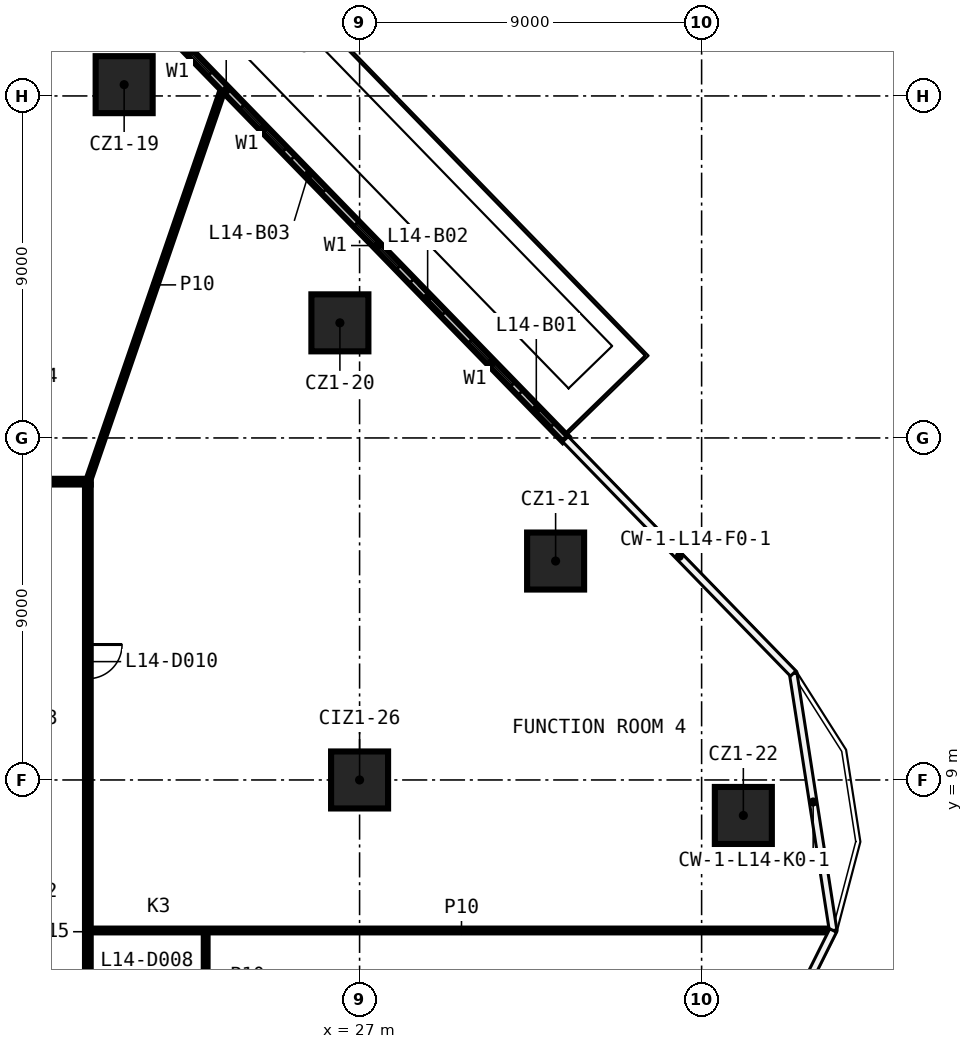
"""IFC4 building model, lengths in metres.
Left out: names, types, materials, properties, quantities, classifications, styles, units other than length and angle.
Written with IfcOpenShell. Run it as: python <this file> out.ifc"""

import sys

from ifc_helpers import new_model, si_unit, direction, frame, frame_2d, origin, origin_2d, place, context, subcontext, project, spatial, rectangle, extrude, element, fill, save


model = new_model("IFC4")
c1 = context("Model", 3, precision=1e-05, world=origin(), true_north=direction((0.0, 1.0)))
c2 = subcontext(c1, "Body", "Model", "MODEL_VIEW")
j1 = project(units=[si_unit("LENGTHUNIT", "METRE"), si_unit("PLANEANGLEUNIT", "RADIAN")], contexts=[c1])
p1 = place(None, origin())
s1 = spatial("IfcSite", under=j1, at=p1, CompositionType="ELEMENT")
p2 = place(p1, origin())
s2 = spatial("IfcBuilding", under=s1, at=p2, CompositionType="ELEMENT")
p3 = place(p2, frame((0.0, 0.0, 73.6)))
s3 = spatial("IfcBuildingStorey", under=s2, at=p3, CompositionType="ELEMENT", Elevation=73.6)
for number, where, z_axis, x_axis in (
    (1, (20.805, 27.297, 0.0), (0.0, 0.0, 1.0), (1.0, 0.0, 0.0)),
    (2, (26.482, 21.029, 0.0), (0.0, 0.0, 1.0), (1.0, 0.0, 0.0)),
    (3, (32.158, 14.761, 0.0), (0.0, 0.0, 1.0), (1.0, 0.0, 0.0)),
    (4, (37.098, 8.066, 0.0), (0.0, 0.0, 1.0), (1.0, 0.0, 0.0)),
    (5, (27.0, 9.0, 0.0), (0.0, 0.0, 1.0), (1.0, 0.0, 0.0)),
):
    element("IfcColumn", number, at=place(p3, frame(where, z_axis=z_axis, x_axis=x_axis)), inside=s3, PredefinedType="COLUMN", context=c2, shape_type="SweptSolid", body=[
        extrude(rectangle(XDim=1.5, YDim=1.5, at=origin_2d()), origin(), (0.0, 0.0, 1.0), 3.3),
    ])
p4 = place(p3, frame((19.925, 5.039, 0.0), z_axis=(0.0, 0.0, 1.0), x_axis=(1.0, 0.0, 0.0)))
e6 = element("IfcWall", 6, at=p4, inside=s3, PredefinedType="PARTITIONING", context=c2, shape_type="SweptSolid", body=[
    extrude(rectangle(XDim=19.513, YDim=0.1, at=frame_2d((9.757, 0.0))), origin(), (0.0, 0.0, 1.0), 3.3),
])
p5 = place(p3, frame((-19.925, 16.85, 0.0), z_axis=(0.0, 0.0, 1.0), x_axis=(1.0, 0.0, 0.0)))
e7 = element("IfcWall", 7, at=p5, inside=s3, PredefinedType="PARTITIONING", context=c2, shape_type="SweptSolid", body=[
    extrude(rectangle(XDim=39.85, YDim=0.15, at=frame_2d((19.925, 0.0))), origin(), (0.0, 0.0, 1.0), 3.3),
])
p6 = place(p5, frame((31.436, 0.0, 0.0)))
e8 = element("IfcOpeningElement", 8, at=p6, cuts=e7, PredefinedType="OPENING", context=c2, shape_type="SweptSolid", body=[
    extrude(rectangle(XDim=0.9, YDim=2.1, at=frame_2d((0.45, 1.05))), frame((0.0, 0.085, 0.0), z_axis=(0.0, -1.0, 0.0), x_axis=(1.0, 0.0, 0.0)), (0.0, 0.0, 1.0), 0.17),
])
p7 = place(p5, frame((16.954, 0.0, 0.0)))
e9 = element("IfcOpeningElement", 9, at=p7, cuts=e7, PredefinedType="OPENING", context=c2, shape_type="SweptSolid", body=[
    extrude(rectangle(XDim=0.9, YDim=2.1, at=frame_2d((0.45, 1.05))), frame((0.0, 0.085, 0.0), z_axis=(0.0, -1.0, 0.0), x_axis=(1.0, 0.0, 0.0)), (0.0, 0.0, 1.0), 0.17),
])
p8 = place(p5, frame((7.208, 0.0, 0.0)))
e10 = element("IfcOpeningElement", 10, at=p8, cuts=e7, PredefinedType="OPENING", context=c2, shape_type="SweptSolid", body=[
    extrude(rectangle(XDim=0.9, YDim=2.1, at=frame_2d((0.45, 1.05))), frame((0.0, 0.085, 0.0), z_axis=(0.0, -1.0, 0.0), x_axis=(1.0, 0.0, 0.0)), (0.0, 0.0, 1.0), 0.17),
])
p9 = place(p3, frame((19.85, 16.85, 0.0), z_axis=(0.0, 0.0, 1.0), x_axis=(0.32525482398, 0.94562640587, 0.0)))
e11 = element("IfcWall", 11, at=p9, inside=s3, PredefinedType="PARTITIONING", context=c2, shape_type="SweptSolid", body=[
    extrude(rectangle(XDim=10.952, YDim=0.1, at=frame_2d((5.476, 0.0))), origin(), (0.0, 0.0, 1.0), 3.3),
])
p10 = place(p3, frame((22.95, 2.689, 0.0), z_axis=(0.0, 0.0, 1.0), x_axis=(0.0, 1.0, 0.0)))
e12 = element("IfcWall", 12, at=p10, inside=s3, PredefinedType="PARTITIONING", context=c2, shape_type="SweptSolid", body=[
    extrude(rectangle(XDim=2.3, YDim=0.1, at=frame_2d((1.15, 0.0))), origin(), (0.0, 0.0, 1.0), 3.3),
])
p11 = place(p3, frame((19.85, 16.775, 0.0), z_axis=(0.0, 0.0, 1.0), x_axis=(0.0, -1.0, 0.0)))
e13 = element("IfcWall", 13, at=p11, inside=s3, PredefinedType="PARTITIONING", context=c2, shape_type="SweptSolid", body=[
    extrude(rectangle(XDim=33.55, YDim=0.15, at=frame_2d((16.775, 0.0))), origin(), (0.0, 0.0, 1.0), 3.3),
])
p12 = place(p11, frame((21.293, 0.0, 0.0)))
e14 = element("IfcOpeningElement", 14, at=p12, cuts=e13, PredefinedType="OPENING", context=c2, shape_type="SweptSolid", body=[
    extrude(rectangle(XDim=1.0, YDim=2.1, at=frame_2d((0.5, 1.05))), frame((0.0, 0.085, 0.0), z_axis=(0.0, -1.0, 0.0), x_axis=(1.0, 0.0, 0.0)), (0.0, 0.0, 1.0), 0.17),
])
p13 = place(p11, frame((18.427, 0.0, 0.0)))
e15 = element("IfcOpeningElement", 15, at=p13, cuts=e13, PredefinedType="OPENING", context=c2, shape_type="SweptSolid", body=[
    extrude(rectangle(XDim=1.0, YDim=2.1, at=frame_2d((0.5, 1.05))), frame((0.0, 0.085, 0.0), z_axis=(0.0, -1.0, 0.0), x_axis=(1.0, 0.0, 0.0)), (0.0, 0.0, 1.0), 0.17),
])
p14 = place(p11, frame((4.211, 0.0, 0.0)))
e16 = element("IfcOpeningElement", 16, at=p14, cuts=e13, PredefinedType="OPENING", context=c2, shape_type="SweptSolid", body=[
    extrude(rectangle(XDim=0.9, YDim=2.1, at=frame_2d((0.45, 1.05))), frame((0.0, 0.085, 0.0), z_axis=(0.0, -1.0, 0.0), x_axis=(1.0, 0.0, 0.0)), (0.0, 0.0, 1.0), 0.17),
])
p15 = place(p3, frame((32.417, 17.969, 0.0), z_axis=(0.0, 0.0, 1.0), x_axis=(-0.696878416696, 0.717189286272, 0.0)))
e17 = element("IfcWall", 17, at=p15, inside=s3, PredefinedType="SOLIDWALL", context=c2, shape_type="SweptSolid", body=[
    extrude(rectangle(XDim=21.516, YDim=0.2, at=frame_2d((10.758, 0.0))), origin(), (0.0, 0.0, 1.0), 3.3),
])
p16 = place(p15, frame((2.0, 0.0, 0.6)))
e18 = element("IfcOpeningElement", 18, at=p16, cuts=e17, PredefinedType="OPENING", context=c2, shape_type="SweptSolid", body=[
    extrude(rectangle(XDim=1.6, YDim=2.4, at=frame_2d((0.8, 1.2))), frame((0.0, 0.11, 0.0), z_axis=(0.0, -1.0, 0.0), x_axis=(1.0, 0.0, 0.0)), (0.0, 0.0, 1.0), 0.22),
])
p17 = place(p15, frame((0.5, 0.0, 0.0)))
e19 = element("IfcOpeningElement", 19, at=p17, cuts=e17, PredefinedType="OPENING", context=c2, shape_type="SweptSolid", body=[
    extrude(rectangle(XDim=1.2, YDim=2.4, at=frame_2d((0.6, 1.2))), frame((0.0, 0.11, 0.0), z_axis=(0.0, -1.0, 0.0), x_axis=(1.0, 0.0, 0.0)), (0.0, 0.0, 1.0), 0.22),
])
p18 = place(p15, frame((6.303, 0.0, 0.6)))
e20 = element("IfcOpeningElement", 20, at=p18, cuts=e17, PredefinedType="OPENING", context=c2, shape_type="SweptSolid", body=[
    extrude(rectangle(XDim=1.6, YDim=2.4, at=frame_2d((0.8, 1.2))), frame((0.0, 0.11, 0.0), z_axis=(0.0, -1.0, 0.0), x_axis=(1.0, 0.0, 0.0)), (0.0, 0.0, 1.0), 0.22),
])
p19 = place(p15, frame((4.603, 0.0, 0.0)))
e21 = element("IfcOpeningElement", 21, at=p19, cuts=e17, PredefinedType="OPENING", context=c2, shape_type="SweptSolid", body=[
    extrude(rectangle(XDim=1.2, YDim=2.4, at=frame_2d((0.6, 1.2))), frame((0.0, 0.11, 0.0), z_axis=(0.0, -1.0, 0.0), x_axis=(1.0, 0.0, 0.0)), (0.0, 0.0, 1.0), 0.22),
])
p20 = place(p15, frame((10.606, 0.0, 0.6)))
e22 = element("IfcOpeningElement", 22, at=p20, cuts=e17, PredefinedType="OPENING", context=c2, shape_type="SweptSolid", body=[
    extrude(rectangle(XDim=1.6, YDim=2.4, at=frame_2d((0.8, 1.2))), frame((0.0, 0.11, 0.0), z_axis=(0.0, -1.0, 0.0), x_axis=(1.0, 0.0, 0.0)), (0.0, 0.0, 1.0), 0.22),
])
p21 = place(p15, frame((9.106, 0.0, 0.0)))
e23 = element("IfcOpeningElement", 23, at=p21, cuts=e17, PredefinedType="OPENING", context=c2, shape_type="SweptSolid", body=[
    extrude(rectangle(XDim=1.2, YDim=2.4, at=frame_2d((0.6, 1.2))), frame((0.0, 0.11, 0.0), z_axis=(0.0, -1.0, 0.0), x_axis=(1.0, 0.0, 0.0)), (0.0, 0.0, 1.0), 0.22),
])
p22 = place(p15, frame((13.41, 0.0, 0.6)))
e24 = element("IfcOpeningElement", 24, at=p22, cuts=e17, PredefinedType="OPENING", context=c2, shape_type="SweptSolid", body=[
    extrude(rectangle(XDim=1.6, YDim=2.4, at=frame_2d((0.8, 1.2))), frame((0.0, 0.11, 0.0), z_axis=(0.0, -1.0, 0.0), x_axis=(1.0, 0.0, 0.0)), (0.0, 0.0, 1.0), 0.22),
])
p23 = place(p15, frame((15.51, 0.0, 0.0)))
e25 = element("IfcOpeningElement", 25, at=p23, cuts=e17, PredefinedType="OPENING", context=c2, shape_type="SweptSolid", body=[
    extrude(rectangle(XDim=1.2, YDim=2.4, at=frame_2d((0.6, 1.2))), frame((0.0, 0.11, 0.0), z_axis=(0.0, -1.0, 0.0), x_axis=(1.0, 0.0, 0.0)), (0.0, 0.0, 1.0), 0.22),
])
p24 = place(p15, frame((19.213, 0.0, 0.6)))
e26 = element("IfcOpeningElement", 26, at=p24, cuts=e17, PredefinedType="OPENING", context=c2, shape_type="SweptSolid", body=[
    extrude(rectangle(XDim=1.6, YDim=2.4, at=frame_2d((0.8, 1.2))), frame((0.0, 0.11, 0.0), z_axis=(0.0, -1.0, 0.0), x_axis=(1.0, 0.0, 0.0)), (0.0, 0.0, 1.0), 0.22),
])
p25 = place(p15, frame((17.713, 0.0, 0.0)))
e27 = element("IfcOpeningElement", 27, at=p25, cuts=e17, PredefinedType="OPENING", context=c2, shape_type="SweptSolid", body=[
    extrude(rectangle(XDim=1.2, YDim=2.4, at=frame_2d((0.6, 1.2))), frame((0.0, 0.11, 0.0), z_axis=(0.0, -1.0, 0.0), x_axis=(1.0, 0.0, 0.0)), (0.0, 0.0, 1.0), 0.22),
])
p26 = place(p14, origin())
e28 = element("IfcDoor", 28, at=p26, inside=s3, OperationType="SINGLE_SWING_RIGHT", PredefinedType="DOOR", context=c2, shape_type="SweptSolid", body=[
    extrude(rectangle(XDim=0.9, YDim=2.1, at=frame_2d((0.45, 1.05))), frame((0.0, 0.025, 0.0), z_axis=(0.0, -1.0, 0.0), x_axis=(1.0, 0.0, 0.0)), (0.0, 0.0, 1.0), 0.05),
])
fill(e16, e28)
p27 = place(p16, origin())
e29 = element("IfcWindow", 29, at=p27, inside=s3, PartitioningType="SINGLE_PANEL", PredefinedType="WINDOW", context=c2, shape_type="SweptSolid", body=[
    extrude(rectangle(XDim=1.6, YDim=2.4, at=frame_2d((0.8, 1.2))), frame((0.0, 0.03, 0.0), z_axis=(0.0, -1.0, 0.0), x_axis=(1.0, 0.0, 0.0)), (0.0, 0.0, 1.0), 0.06),
])
fill(e18, e29)
p28 = place(p17, origin())
e30 = element("IfcDoor", 30, at=p28, inside=s3, OperationType="SLIDING_TO_LEFT", PredefinedType="DOOR", context=c2, shape_type="SweptSolid", body=[
    extrude(rectangle(XDim=1.2, YDim=2.4, at=frame_2d((0.6, 1.2))), frame((0.0, 0.025, 0.0), z_axis=(0.0, -1.0, 0.0), x_axis=(1.0, 0.0, 0.0)), (0.0, 0.0, 1.0), 0.05),
])
fill(e19, e30)
p29 = place(p18, origin())
e31 = element("IfcWindow", 31, at=p29, inside=s3, PartitioningType="SINGLE_PANEL", PredefinedType="WINDOW", context=c2, shape_type="SweptSolid", body=[
    extrude(rectangle(XDim=1.6, YDim=2.4, at=frame_2d((0.8, 1.2))), frame((0.0, 0.03, 0.0), z_axis=(0.0, -1.0, 0.0), x_axis=(1.0, 0.0, 0.0)), (0.0, 0.0, 1.0), 0.06),
])
fill(e20, e31)
p30 = place(p19, origin())
e32 = element("IfcDoor", 32, at=p30, inside=s3, OperationType="SLIDING_TO_LEFT", PredefinedType="DOOR", context=c2, shape_type="SweptSolid", body=[
    extrude(rectangle(XDim=1.2, YDim=2.4, at=frame_2d((0.6, 1.2))), frame((0.0, 0.025, 0.0), z_axis=(0.0, -1.0, 0.0), x_axis=(1.0, 0.0, 0.0)), (0.0, 0.0, 1.0), 0.05),
])
fill(e21, e32)
p31 = place(p20, origin())
e33 = element("IfcWindow", 33, at=p31, inside=s3, PartitioningType="SINGLE_PANEL", PredefinedType="WINDOW", context=c2, shape_type="SweptSolid", body=[
    extrude(rectangle(XDim=1.6, YDim=2.4, at=frame_2d((0.8, 1.2))), frame((0.0, 0.03, 0.0), z_axis=(0.0, -1.0, 0.0), x_axis=(1.0, 0.0, 0.0)), (0.0, 0.0, 1.0), 0.06),
])
fill(e22, e33)
p32 = place(p21, origin())
e34 = element("IfcDoor", 34, at=p32, inside=s3, OperationType="SLIDING_TO_LEFT", PredefinedType="DOOR", context=c2, shape_type="SweptSolid", body=[
    extrude(rectangle(XDim=1.2, YDim=2.4, at=frame_2d((0.6, 1.2))), frame((0.0, 0.025, 0.0), z_axis=(0.0, -1.0, 0.0), x_axis=(1.0, 0.0, 0.0)), (0.0, 0.0, 1.0), 0.05),
])
fill(e23, e34)
p33 = place(p22, origin())
e35 = element("IfcWindow", 35, at=p33, inside=s3, PartitioningType="SINGLE_PANEL", PredefinedType="WINDOW", context=c2, shape_type="SweptSolid", body=[
    extrude(rectangle(XDim=1.6, YDim=2.4, at=frame_2d((0.8, 1.2))), frame((0.0, 0.03, 0.0), z_axis=(0.0, -1.0, 0.0), x_axis=(1.0, 0.0, 0.0)), (0.0, 0.0, 1.0), 0.06),
])
fill(e24, e35)
save(model, sys.argv[1])
